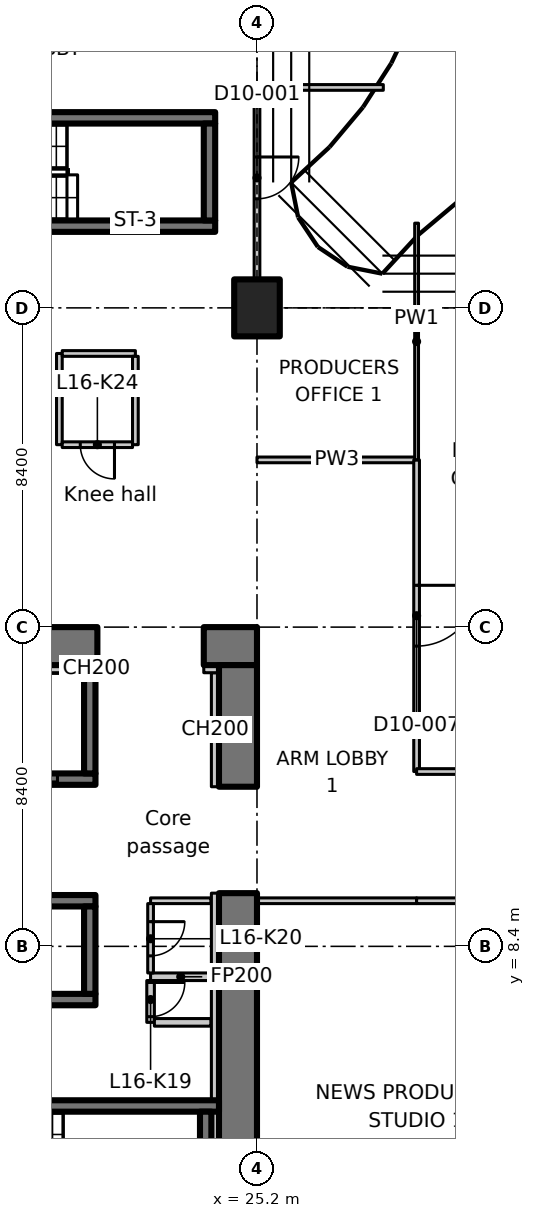
"""IFC4 building model, lengths in metres.
Left out: names, types, materials, properties, quantities, classifications, styles, units other than length and angle.
Written with IfcOpenShell. Run it as: python <this file> out.ifc"""

import sys

from ifc_helpers import new_model, si_unit, direction, frame, frame_2d, origin, origin_2d, place, context, subcontext, project, spatial, polyline, rectangle, outline, extrude, element, fill, save


model = new_model("IFC4")
c1 = context("Model", 3, precision=1e-05, world=origin(), true_north=direction((0.0, 1.0)))
c2 = subcontext(c1, "Body", "Model", "MODEL_VIEW")
j1 = project(units=[si_unit("LENGTHUNIT", "METRE"), si_unit("PLANEANGLEUNIT", "RADIAN")], contexts=[c1])
p1 = place(None, origin())
s1 = spatial("IfcSite", under=j1, at=p1, CompositionType="ELEMENT")
p2 = place(p1, origin())
s2 = spatial("IfcBuilding", under=s1, at=p2, CompositionType="ELEMENT")
p3 = place(p2, frame((0.0, 0.0, 72.5)))
s3 = spatial("IfcBuildingStorey", under=s2, at=p3, CompositionType="ELEMENT", Elevation=72.5)
p4 = place(p3, frame((25.2, 25.2, 0.0), z_axis=(0.0, 0.0, 1.0), x_axis=(1.0, 0.0, 0.0)))
e1 = element("IfcColumn", 1, at=p4, inside=s3, PredefinedType="COLUMN", context=c2, shape_type="SweptSolid", body=[
    extrude(rectangle(XDim=1.2, YDim=1.5, at=origin_2d()), origin(), (0.0, 0.0, 1.0), 3.35),
])
p5 = place(p3, frame((-1.1, 16.3, 0.0), z_axis=(0.0, 0.0, 1.0), x_axis=(1.0, 0.0, 0.0)))
e2 = element("IfcWall", 2, at=p5, inside=s3, PredefinedType="SHEAR", context=c2, shape_type="SweptSolid", body=[
    extrude(rectangle(XDim=22.1, YDim=1.0, at=frame_2d((11.05, 0.0))), origin(), (0.0, 0.0, 1.0), 3.35),
])
p6 = place(p5, frame((3.15, 0.0, 0.0)))
e3 = element("IfcOpeningElement", 3, at=p6, cuts=e2, PredefinedType="OPENING", context=c2, shape_type="SweptSolid", body=[
    extrude(rectangle(XDim=1.1, YDim=2.3, at=frame_2d((0.55, 1.15))), frame((0.0, 0.51, 0.0), z_axis=(0.0, -1.0, 0.0), x_axis=(1.0, 0.0, 0.0)), (0.0, 0.0, 1.0), 1.02),
])
p7 = place(p3, frame((23.8, 16.3, 0.0), z_axis=(0.0, 0.0, 1.0), x_axis=(1.0, 0.0, 0.0)))
e4 = element("IfcWall", 4, at=p7, inside=s3, PredefinedType="SHEAR", context=c2, shape_type="SweptSolid", body=[
    extrude(rectangle(XDim=1.4, YDim=1.0, at=frame_2d((0.7, 0.0))), origin(), (0.0, 0.0, 1.0), 3.35),
])
p8 = place(p3, frame((24.7, 1.0, 0.0), z_axis=(0.0, 0.0, 1.0), x_axis=(0.0, 1.0, 0.0)))
e5 = element("IfcWall", 5, at=p8, inside=s3, PredefinedType="SHEAR", context=c2, shape_type="SweptSolid", body=[
    extrude(rectangle(XDim=8.8, YDim=1.0, at=frame_2d((4.4, 0.0))), origin(), (0.0, 0.0, 1.0), 3.35),
])
p9 = place(p3, frame((24.7, 12.6, 0.0), z_axis=(0.0, 0.0, 1.0), x_axis=(0.0, 1.0, 0.0)))
e6 = element("IfcWall", 6, at=p9, inside=s3, PredefinedType="SHEAR", context=c2, shape_type="SweptSolid", body=[
    extrude(rectangle(XDim=3.2, YDim=1.0, at=frame_2d((1.6, 0.0))), origin(), (0.0, 0.0, 1.0), 3.35),
])
p10 = place(p3, frame((24.1, 12.6, 0.0), z_axis=(0.0, 0.0, 1.0), x_axis=(0.0, 1.0, 0.0)))
e7 = element("IfcWall", 7, at=p10, inside=s3, PredefinedType="PARTITIONING", context=c2, shape_type="SweptSolid", body=[
    extrude(rectangle(XDim=3.0, YDim=0.2, at=frame_2d((1.5, 0.0))), origin(), (0.0, 0.0, 1.0), 3.35),
])
p11 = place(p3, frame((23.8, 15.7, 0.0), z_axis=(0.0, 0.0, 1.0), x_axis=(1.0, 0.0, 0.0)))
e8 = element("IfcWall", 8, at=p11, inside=s3, PredefinedType="PARTITIONING", context=c2, shape_type="SweptSolid", body=[
    extrude(rectangle(XDim=0.4, YDim=0.2, at=frame_2d((0.2, 0.0))), origin(), (0.0, 0.0, 1.0), 3.35),
])
p12 = place(p3, frame((1.0, 7.0, 0.0), z_axis=(0.0, 0.0, 1.0), x_axis=(1.0, 0.0, 0.0)))
e9 = element("IfcWall", 9, at=p12, inside=s3, PredefinedType="SHEAR", context=c2, shape_type="SweptSolid", body=[
    extrude(rectangle(XDim=19.95, YDim=0.3, at=frame_2d((9.975, 0.0))), origin(), (0.0, 0.0, 1.0), 3.35),
])
p13 = place(p3, frame((1.0, 9.6, 0.0), z_axis=(0.0, 0.0, 1.0), x_axis=(1.0, 0.0, 0.0)))
e10 = element("IfcWall", 10, at=p13, inside=s3, PredefinedType="SHEAR", context=c2, shape_type="SweptSolid", body=[
    extrude(rectangle(XDim=19.95, YDim=0.3, at=frame_2d((9.975, 0.0))), origin(), (0.0, 0.0, 1.0), 3.35),
])
p14 = place(p13, frame((1.05, 0.0, 0.0)))
e11 = element("IfcOpeningElement", 11, at=p14, cuts=e10, PredefinedType="OPENING", context=c2, shape_type="SweptSolid", body=[
    extrude(rectangle(XDim=1.1, YDim=2.3, at=frame_2d((0.55, 1.15))), frame((0.0, 0.16, 0.0), z_axis=(0.0, -1.0, 0.0), x_axis=(1.0, 0.0, 0.0)), (0.0, 0.0, 1.0), 0.32),
])
p15 = place(p13, frame((3.85, 0.0, 0.0)))
e12 = element("IfcOpeningElement", 12, at=p15, cuts=e10, PredefinedType="OPENING", context=c2, shape_type="SweptSolid", body=[
    extrude(rectangle(XDim=1.1, YDim=2.3, at=frame_2d((0.55, 1.15))), frame((0.0, 0.16, 0.0), z_axis=(0.0, -1.0, 0.0), x_axis=(1.0, 0.0, 0.0)), (0.0, 0.0, 1.0), 0.32),
])
p16 = place(p13, frame((6.65, 0.0, 0.0)))
e13 = element("IfcOpeningElement", 13, at=p16, cuts=e10, PredefinedType="OPENING", context=c2, shape_type="SweptSolid", body=[
    extrude(rectangle(XDim=1.1, YDim=2.3, at=frame_2d((0.55, 1.15))), frame((0.0, 0.16, 0.0), z_axis=(0.0, -1.0, 0.0), x_axis=(1.0, 0.0, 0.0)), (0.0, 0.0, 1.0), 0.32),
])
p17 = place(p13, frame((9.45, 0.0, 0.0)))
e14 = element("IfcOpeningElement", 14, at=p17, cuts=e10, PredefinedType="OPENING", context=c2, shape_type="SweptSolid", body=[
    extrude(rectangle(XDim=1.1, YDim=2.3, at=frame_2d((0.55, 1.15))), frame((0.0, 0.16, 0.0), z_axis=(0.0, -1.0, 0.0), x_axis=(1.0, 0.0, 0.0)), (0.0, 0.0, 1.0), 0.32),
])
p18 = place(p13, frame((12.25, 0.0, 0.0)))
e15 = element("IfcOpeningElement", 15, at=p18, cuts=e10, PredefinedType="OPENING", context=c2, shape_type="SweptSolid", body=[
    extrude(rectangle(XDim=1.1, YDim=2.3, at=frame_2d((0.55, 1.15))), frame((0.0, 0.16, 0.0), z_axis=(0.0, -1.0, 0.0), x_axis=(1.0, 0.0, 0.0)), (0.0, 0.0, 1.0), 0.32),
])
p19 = place(p13, frame((15.05, 0.0, 0.0)))
e16 = element("IfcOpeningElement", 16, at=p19, cuts=e10, PredefinedType="OPENING", context=c2, shape_type="SweptSolid", body=[
    extrude(rectangle(XDim=1.1, YDim=2.3, at=frame_2d((0.55, 1.15))), frame((0.0, 0.16, 0.0), z_axis=(0.0, -1.0, 0.0), x_axis=(1.0, 0.0, 0.0)), (0.0, 0.0, 1.0), 0.32),
])
p20 = place(p3, frame((20.8, 7.15, 0.0), z_axis=(0.0, 0.0, 1.0), x_axis=(0.0, 1.0, 0.0)))
e17 = element("IfcWall", 17, at=p20, inside=s3, PredefinedType="SHEAR", context=c2, shape_type="SweptSolid", body=[
    extrude(rectangle(XDim=2.3, YDim=0.3, at=frame_2d((1.15, 0.0))), origin(), (0.0, 0.0, 1.0), 3.35),
])
p21 = place(p3, frame((15.05, 12.8, 0.0), z_axis=(0.0, 0.0, 1.0), x_axis=(1.0, 0.0, 0.0)))
e18 = element("IfcWall", 18, at=p21, inside=s3, PredefinedType="SHEAR", context=c2, shape_type="SweptSolid", body=[
    extrude(rectangle(XDim=5.9, YDim=0.3, at=frame_2d((2.95, 0.0))), origin(), (0.0, 0.0, 1.0), 3.35),
])
p22 = place(p21, frame((3.8, 0.0, 0.0)))
e19 = element("IfcOpeningElement", 19, at=p22, cuts=e18, PredefinedType="OPENING", context=c2, shape_type="SweptSolid", body=[
    extrude(rectangle(XDim=1.1, YDim=2.3, at=frame_2d((0.55, 1.15))), frame((0.0, 0.16, 0.0), z_axis=(0.0, -1.0, 0.0), x_axis=(1.0, 0.0, 0.0)), (0.0, 0.0, 1.0), 0.32),
])
p23 = place(p3, frame((20.8, 12.95, 0.0), z_axis=(0.0, 0.0, 1.0), x_axis=(0.0, 1.0, 0.0)))
e20 = element("IfcWall", 20, at=p23, inside=s3, PredefinedType="SHEAR", context=c2, shape_type="SweptSolid", body=[
    extrude(rectangle(XDim=2.85, YDim=0.3, at=frame_2d((1.425, 0.0))), origin(), (0.0, 0.0, 1.0), 3.35),
])
p24 = place(p3, frame((15.8, 4.2, 0.0), z_axis=(0.0, 0.0, 1.0), x_axis=(1.0, 0.0, 0.0)))
e21 = element("IfcWall", 21, at=p24, inside=s3, PredefinedType="SHEAR", context=c2, shape_type="SweptSolid", body=[
    extrude(rectangle(XDim=8.4, YDim=0.3, at=frame_2d((4.2, 0.0))), origin(), (0.0, 0.0, 1.0), 3.35),
])
p25 = place(p24, frame((0.4, 0.0, 0.0)))
e22 = element("IfcOpeningElement", 22, at=p25, cuts=e21, PredefinedType="OPENING", context=c2, shape_type="SweptSolid", body=[
    extrude(rectangle(XDim=1.0, YDim=2.1, at=frame_2d((0.5, 1.05))), frame((0.0, 0.16, 0.0), z_axis=(0.0, -1.0, 0.0), x_axis=(1.0, 0.0, 0.0)), (0.0, 0.0, 1.0), 0.32),
])
p26 = place(p3, frame((23.85, 1.5, 0.0), z_axis=(0.0, 0.0, 1.0), x_axis=(0.0, 1.0, 0.0)))
e23 = element("IfcWall", 23, at=p26, inside=s3, PredefinedType="SHEAR", context=c2, shape_type="SweptSolid", body=[
    extrude(rectangle(XDim=2.55, YDim=0.3, at=frame_2d((1.275, 0.0))), origin(), (0.0, 0.0, 1.0), 3.35),
])
for number, where, z_axis, x_axis in (
    (24, (15.9, 27.35, 0.0), (0.0, 0.0, 1.0), (1.0, 0.0, 0.0)),
    (25, (15.9, 30.2, 0.0), (0.0, 0.0, 1.0), (1.0, 0.0, 0.0)),
):
    element("IfcWall", number, at=place(p3, frame(where, z_axis=z_axis, x_axis=x_axis)), inside=s3, PredefinedType="SHEAR", context=c2, shape_type="SweptSolid", body=[
        extrude(rectangle(XDim=8.2, YDim=0.3, at=frame_2d((4.1, 0.0))), origin(), (0.0, 0.0, 1.0), 3.35),
    ])
p27 = place(p3, frame((23.95, 27.5, 0.0), z_axis=(0.0, 0.0, 1.0), x_axis=(0.0, 1.0, 0.0)))
e26 = element("IfcWall", 26, at=p27, inside=s3, PredefinedType="SHEAR", context=c2, shape_type="SweptSolid", body=[
    extrude(rectangle(XDim=2.55, YDim=0.3, at=frame_2d((1.275, 0.0))), origin(), (0.0, 0.0, 1.0), 3.35),
])
p28 = place(p3, frame((23.988, 7.6, 0.0), z_axis=(0.0, 0.0, 1.0), x_axis=(-1.0, 0.0, 0.0)))
e27 = element("IfcWall", 27, at=p28, inside=s3, PredefinedType="PARTITIONING", context=c2, shape_type="SweptSolid", body=[
    extrude(rectangle(XDim=1.588, YDim=0.2, at=frame_2d((0.794, 0.0))), origin(), (0.0, 0.0, 1.0), 3.35),
])
p29 = place(p3, frame((22.4, 7.5, 0.0), z_axis=(0.0, 0.0, 1.0), x_axis=(0.0, -1.0, 0.0)))
e28 = element("IfcWall", 28, at=p29, inside=s3, PredefinedType="PARTITIONING", context=c2, shape_type="SweptSolid", body=[
    extrude(rectangle(XDim=1.1, YDim=0.2, at=frame_2d((0.55, 0.0))), origin(), (0.0, 0.0, 1.0), 3.35),
])
p30 = place(p29, frame((0.05, 0.0, 0.0)))
e29 = element("IfcOpeningElement", 29, at=p30, cuts=e28, PredefinedType="OPENING", context=c2, shape_type="SweptSolid", body=[
    extrude(rectangle(XDim=0.9, YDim=2.1, at=frame_2d((0.45, 1.05))), frame((0.0, 0.11, 0.0), z_axis=(0.0, -1.0, 0.0), x_axis=(1.0, 0.0, 0.0)), (0.0, 0.0, 1.0), 0.22),
])
p31 = place(p3, frame((22.5, 6.4, 0.0), z_axis=(0.0, 0.0, 1.0), x_axis=(1.0, 0.0, 0.0)))
e30 = element("IfcWall", 30, at=p31, inside=s3, PredefinedType="PARTITIONING", context=c2, shape_type="SweptSolid", body=[
    extrude(rectangle(XDim=1.488, YDim=0.2, at=frame_2d((0.744, 0.0))), origin(), (0.0, 0.0, 1.0), 3.35),
])
p32 = place(p3, frame((23.988, 9.6, 0.0), z_axis=(0.0, 0.0, 1.0), x_axis=(-1.0, 0.0, 0.0)))
e31 = element("IfcWall", 31, at=p32, inside=s3, PredefinedType="PARTITIONING", context=c2, shape_type="SweptSolid", body=[
    extrude(rectangle(XDim=1.588, YDim=0.15, at=frame_2d((0.794, 0.0))), origin(), (0.0, 0.0, 1.0), 3.35),
])
p33 = place(p3, frame((22.4, 9.525, 0.0), z_axis=(0.0, 0.0, 1.0), x_axis=(0.0, -1.0, 0.0)))
e32 = element("IfcWall", 32, at=p33, inside=s3, PredefinedType="PARTITIONING", context=c2, shape_type="SweptSolid", body=[
    extrude(rectangle(XDim=1.825, YDim=0.15, at=frame_2d((0.913, 0.0))), origin(), (0.0, 0.0, 1.0), 3.35),
])
p34 = place(p33, frame((0.475, 0.0, 0.0)))
e33 = element("IfcOpeningElement", 33, at=p34, cuts=e32, PredefinedType="OPENING", context=c2, shape_type="SweptSolid", body=[
    extrude(rectangle(XDim=0.9, YDim=2.1, at=frame_2d((0.45, 1.05))), frame((0.0, 0.085, 0.0), z_axis=(0.0, -1.0, 0.0), x_axis=(1.0, 0.0, 0.0)), (0.0, 0.0, 1.0), 0.17),
])
p35 = place(p3, frame((20.0, 21.6, 0.0), z_axis=(0.0, 0.0, 1.0), x_axis=(0.0, 1.0, 0.0)))
e34 = element("IfcWall", 34, at=p35, inside=s3, PredefinedType="PARTITIONING", context=c2, shape_type="SweptSolid", body=[
    extrude(rectangle(XDim=2.4, YDim=0.15, at=frame_2d((1.2, 0.0))), origin(), (0.0, 0.0, 1.0), 3.35),
])
p36 = place(p3, frame((20.075, 24.0, 0.0), z_axis=(0.0, 0.0, 1.0), x_axis=(1.0, 0.0, 0.0)))
e35 = element("IfcWall", 35, at=p36, inside=s3, PredefinedType="PARTITIONING", context=c2, shape_type="SweptSolid", body=[
    extrude(rectangle(XDim=1.925, YDim=0.15, at=frame_2d((0.962, 0.0))), origin(), (0.0, 0.0, 1.0), 3.35),
])
p37 = place(p3, frame((22.0, 23.925, 0.0), z_axis=(0.0, 0.0, 1.0), x_axis=(0.0, -1.0, 0.0)))
e36 = element("IfcWall", 36, at=p37, inside=s3, PredefinedType="PARTITIONING", context=c2, shape_type="SweptSolid", body=[
    extrude(rectangle(XDim=2.325, YDim=0.15, at=frame_2d((1.163, 0.0))), origin(), (0.0, 0.0, 1.0), 3.35),
])
p38 = place(p3, frame((21.925, 21.6, 0.0), z_axis=(0.0, 0.0, 1.0), x_axis=(-1.0, 0.0, 0.0)))
e37 = element("IfcWall", 37, at=p38, inside=s3, PredefinedType="PARTITIONING", context=c2, shape_type="SweptSolid", body=[
    extrude(rectangle(XDim=1.85, YDim=0.15, at=frame_2d((0.925, 0.0))), origin(), (0.0, 0.0, 1.0), 3.35),
])
p39 = place(p38, frame((0.475, 0.0, 0.0)))
e38 = element("IfcOpeningElement", 38, at=p39, cuts=e37, PredefinedType="OPENING", context=c2, shape_type="SweptSolid", body=[
    extrude(rectangle(XDim=0.9, YDim=2.1, at=frame_2d((0.45, 1.05))), frame((0.0, 0.085, 0.0), z_axis=(0.0, -1.0, 0.0), x_axis=(1.0, 0.0, 0.0)), (0.0, 0.0, 1.0), 0.17),
])
p40 = place(p3, frame((18.15, 15.7, 0.0), z_axis=(0.0, 0.0, 1.0), x_axis=(1.0, 0.0, 0.0)))
e39 = element("IfcWall", 39, at=p40, inside=s3, PredefinedType="PARTITIONING", context=c2, shape_type="SweptSolid", body=[
    extrude(rectangle(XDim=2.5, YDim=0.2, at=frame_2d((1.25, 0.0))), origin(), (0.0, 0.0, 1.0), 3.35),
])
p41 = place(p3, frame((20.95, 15.7, 0.0), z_axis=(0.0, 0.0, 1.0), x_axis=(1.0, 0.0, 0.0)))
e40 = element("IfcWall", 40, at=p41, inside=s3, PredefinedType="PARTITIONING", context=c2, shape_type="SweptSolid", body=[
    extrude(rectangle(XDim=0.05, YDim=0.2, at=frame_2d((0.025, 0.0))), origin(), (0.0, 0.0, 1.0), 3.35),
])
p42 = place(p3, frame((24.1, 1.5, 0.0), z_axis=(0.0, 0.0, 1.0), x_axis=(0.0, 1.0, 0.0)))
e41 = element("IfcWall", 41, at=p42, inside=s3, PredefinedType="PARTITIONING", context=c2, shape_type="SweptSolid", body=[
    extrude(rectangle(XDim=2.55, YDim=0.2, at=frame_2d((1.275, 0.0))), origin(), (0.0, 0.0, 1.0), 3.35),
])
p43 = place(p3, frame((24.1, 4.35, 0.0), z_axis=(0.0, 0.0, 1.0), x_axis=(0.0, 1.0, 0.0)))
e42 = element("IfcWall", 42, at=p43, inside=s3, PredefinedType="PARTITIONING", context=c2, shape_type="SweptSolid", body=[
    extrude(rectangle(XDim=5.45, YDim=0.2, at=frame_2d((2.725, 0.0))), origin(), (0.0, 0.0, 1.0), 3.35),
])
for number, where, z_axis, x_axis in (
    (43, (25.2, 21.2, 0.0), (0.0, 0.0, 1.0), (1.0, 0.0, 0.0)),
    (44, (29.4, 9.6, 0.0), (0.0, 0.0, 1.0), (-1.0, 0.0, 0.0)),
):
    element("IfcWall", number, at=place(p3, frame(where, z_axis=z_axis, x_axis=x_axis)), inside=s3, PredefinedType="PARTITIONING", context=c2, shape_type="SweptSolid", body=[
        extrude(rectangle(XDim=4.2, YDim=0.15, at=frame_2d((2.1, 0.0))), origin(), (0.0, 0.0, 1.0), 3.33),
    ])
p44 = place(p3, frame((29.4, 21.2, 0.0), z_axis=(0.0, 0.0, 1.0), x_axis=(0.0, -1.0, 0.0)))
e45 = element("IfcWall", 45, at=p44, inside=s3, PredefinedType="PARTITIONING", context=c2, shape_type="SweptSolid", body=[
    extrude(rectangle(XDim=8.2, YDim=0.15, at=frame_2d((4.1, 0.0))), origin(), (0.0, 0.0, 1.0), 3.33),
])
p45 = place(p44, frame((3.3, 0.0, 0.0)))
e46 = element("IfcOpeningElement", 46, at=p45, cuts=e45, PredefinedType="OPENING", context=c2, shape_type="SweptSolid", body=[
    extrude(rectangle(XDim=1.6, YDim=2.1, at=frame_2d((0.8, 1.05))), frame((0.0, 0.085, 0.0), z_axis=(0.0, -1.0, 0.0), x_axis=(1.0, 0.0, 0.0)), (0.0, 0.0, 1.0), 0.17),
])
p46 = place(p3, frame((29.4, 27.429, 0.0), z_axis=(0.0, 0.0, 1.0), x_axis=(0.0, -1.0, 0.0)))
e47 = element("IfcWall", 47, at=p46, inside=s3, PredefinedType="PARTITIONING", context=c2, shape_type="SweptSolid", body=[
    extrude(outline(polyline([(0.0, 0.0), (6.229, 0.0), (6.229, 3.33), (2.679, 3.33), (2.677, 2.98), (1.781, 2.98), (1.779, 3.33), (0.154, 3.33), (0.0, 3.33), (0.0, 0.0)])), frame((0.0, 0.05, 0.0), z_axis=(0.0, -1.0, 0.0), x_axis=(1.0, 0.0, 0.0)), (0.0, 0.0, 1.0), 0.1),
])
p47 = place(p3, frame((25.2, 31.0, 0.0), z_axis=(0.0, 0.0, 1.0), x_axis=(0.0, -1.0, 0.0)))
e48 = element("IfcWall", 48, at=p47, inside=s3, PredefinedType="PARTITIONING", context=c2, shape_type="SweptSolid", body=[
    extrude(outline(polyline([(0.0, 0.0), (5.03, 0.0), (5.03, 2.98), (0.0, 2.98), (0.0, 0.0)])), frame((0.0, 0.075, 0.0), z_axis=(0.0, -1.0, 0.0), x_axis=(1.0, 0.0, 0.0)), (0.0, 0.0, 1.0), 0.15),
])
p48 = place(p47, frame((1.83, 0.0, 0.0)))
e49 = element("IfcOpeningElement", 49, at=p48, cuts=e48, PredefinedType="OPENING", context=c2, shape_type="SweptSolid", body=[
    extrude(rectangle(XDim=1.1, YDim=2.1, at=frame_2d((0.55, 1.05))), frame((0.0, 0.085, 0.0), z_axis=(0.0, -1.0, 0.0), x_axis=(1.0, 0.0, 0.0)), (0.0, 0.0, 1.0), 0.17),
])
p49 = place(p3, frame((25.2, 31.0, 0.0), z_axis=(0.0, 0.0, 1.0), x_axis=(1.0, 0.0, 0.0)))
e50 = element("IfcWall", 50, at=p49, inside=s3, PredefinedType="PARTITIONING", context=c2, shape_type="SweptSolid", body=[
    extrude(rectangle(XDim=3.324, YDim=0.15, at=frame_2d((1.662, 0.0))), origin(), (0.0, 0.0, 1.0), 2.98),
])
p50 = place(p3, frame((33.6, 9.6, 0.0), z_axis=(0.0, 0.0, 1.0), x_axis=(-1.0, 0.0, 0.0)))
e51 = element("IfcWall", 51, at=p50, inside=s3, PredefinedType="PARTITIONING", context=c2, shape_type="SweptSolid", body=[
    extrude(rectangle(XDim=4.2, YDim=0.15, at=frame_2d((2.1, 0.0))), origin(), (0.0, 0.0, 1.0), 3.33),
])
p51 = place(p50, frame((1.2, 0.0, 0.0)))
e52 = element("IfcOpeningElement", 52, at=p51, cuts=e51, PredefinedType="OPENING", context=c2, shape_type="SweptSolid", body=[
    extrude(rectangle(XDim=1.6, YDim=2.1, at=frame_2d((0.8, 1.05))), frame((0.0, 0.085, 0.0), z_axis=(0.0, -1.0, 0.0), x_axis=(1.0, 0.0, 0.0)), (0.0, 0.0, 1.0), 0.17),
])
p52 = place(p3, frame((29.4, 13.0, 0.0), z_axis=(0.0, 0.0, 1.0), x_axis=(1.0, 0.0, 0.0)))
e53 = element("IfcWall", 53, at=p52, inside=s3, PredefinedType="PARTITIONING", context=c2, shape_type="SweptSolid", body=[
    extrude(rectangle(XDim=4.2, YDim=0.15, at=frame_2d((2.1, 0.0))), origin(), (0.0, 0.0, 1.0), 3.33),
])
p53 = place(p22, origin())
e54 = element("IfcDoor", 54, at=p53, inside=s3, OperationType="SLIDING_TO_LEFT", PredefinedType="DOOR", context=c2, shape_type="SweptSolid", body=[
    extrude(rectangle(XDim=1.1, YDim=2.3, at=frame_2d((0.55, 1.15))), frame((0.0, 0.025, 0.0), z_axis=(0.0, -1.0, 0.0), x_axis=(1.0, 0.0, 0.0)), (0.0, 0.0, 1.0), 0.05),
])
fill(e19, e54)
p54 = place(p30, origin())
e55 = element("IfcDoor", 55, at=p54, inside=s3, OperationType="SINGLE_SWING_RIGHT", PredefinedType="DOOR", context=c2, shape_type="SweptSolid", body=[
    extrude(rectangle(XDim=0.9, YDim=2.1, at=frame_2d((0.45, 1.05))), frame((0.0, 0.025, 0.0), z_axis=(0.0, -1.0, 0.0), x_axis=(1.0, 0.0, 0.0)), (0.0, 0.0, 1.0), 0.05),
])
fill(e29, e55)
p55 = place(p34, origin())
e56 = element("IfcDoor", 56, at=p55, inside=s3, OperationType="SINGLE_SWING_LEFT", PredefinedType="DOOR", context=c2, shape_type="SweptSolid", body=[
    extrude(rectangle(XDim=0.9, YDim=2.1, at=frame_2d((0.45, 1.05))), frame((0.0, 0.025, 0.0), z_axis=(0.0, -1.0, 0.0), x_axis=(1.0, 0.0, 0.0)), (0.0, 0.0, 1.0), 0.05),
])
fill(e33, e56)
p56 = place(p39, origin())
e57 = element("IfcDoor", 57, at=p56, inside=s3, OperationType="SINGLE_SWING_LEFT", PredefinedType="DOOR", context=c2, shape_type="SweptSolid", body=[
    extrude(rectangle(XDim=0.9, YDim=2.1, at=frame_2d((0.45, 1.05))), frame((0.0, 0.025, 0.0), z_axis=(0.0, -1.0, 0.0), x_axis=(1.0, 0.0, 0.0)), (0.0, 0.0, 1.0), 0.05),
])
fill(e38, e57)
p57 = place(p48, origin())
e58 = element("IfcDoor", 58, at=p57, inside=s3, OperationType="SINGLE_SWING_RIGHT", PredefinedType="DOOR", context=c2, shape_type="SweptSolid", body=[
    extrude(rectangle(XDim=1.1, YDim=2.1, at=frame_2d((0.55, 1.05))), frame((0.0, 0.025, 0.0), z_axis=(0.0, -1.0, 0.0), x_axis=(1.0, 0.0, 0.0)), (0.0, 0.0, 1.0), 0.05),
])
fill(e49, e58)
p58 = place(p45, origin())
e59 = element("IfcDoor", 59, at=p58, inside=s3, OperationType="DOUBLE_DOOR_SINGLE_SWING", PredefinedType="DOOR", context=c2, shape_type="SweptSolid", body=[
    extrude(rectangle(XDim=1.6, YDim=2.1, at=frame_2d((0.8, 1.05))), frame((0.0, 0.025, 0.0), z_axis=(0.0, -1.0, 0.0), x_axis=(1.0, 0.0, 0.0)), (0.0, 0.0, 1.0), 0.05),
])
fill(e46, e59)
save(model, sys.argv[1])
